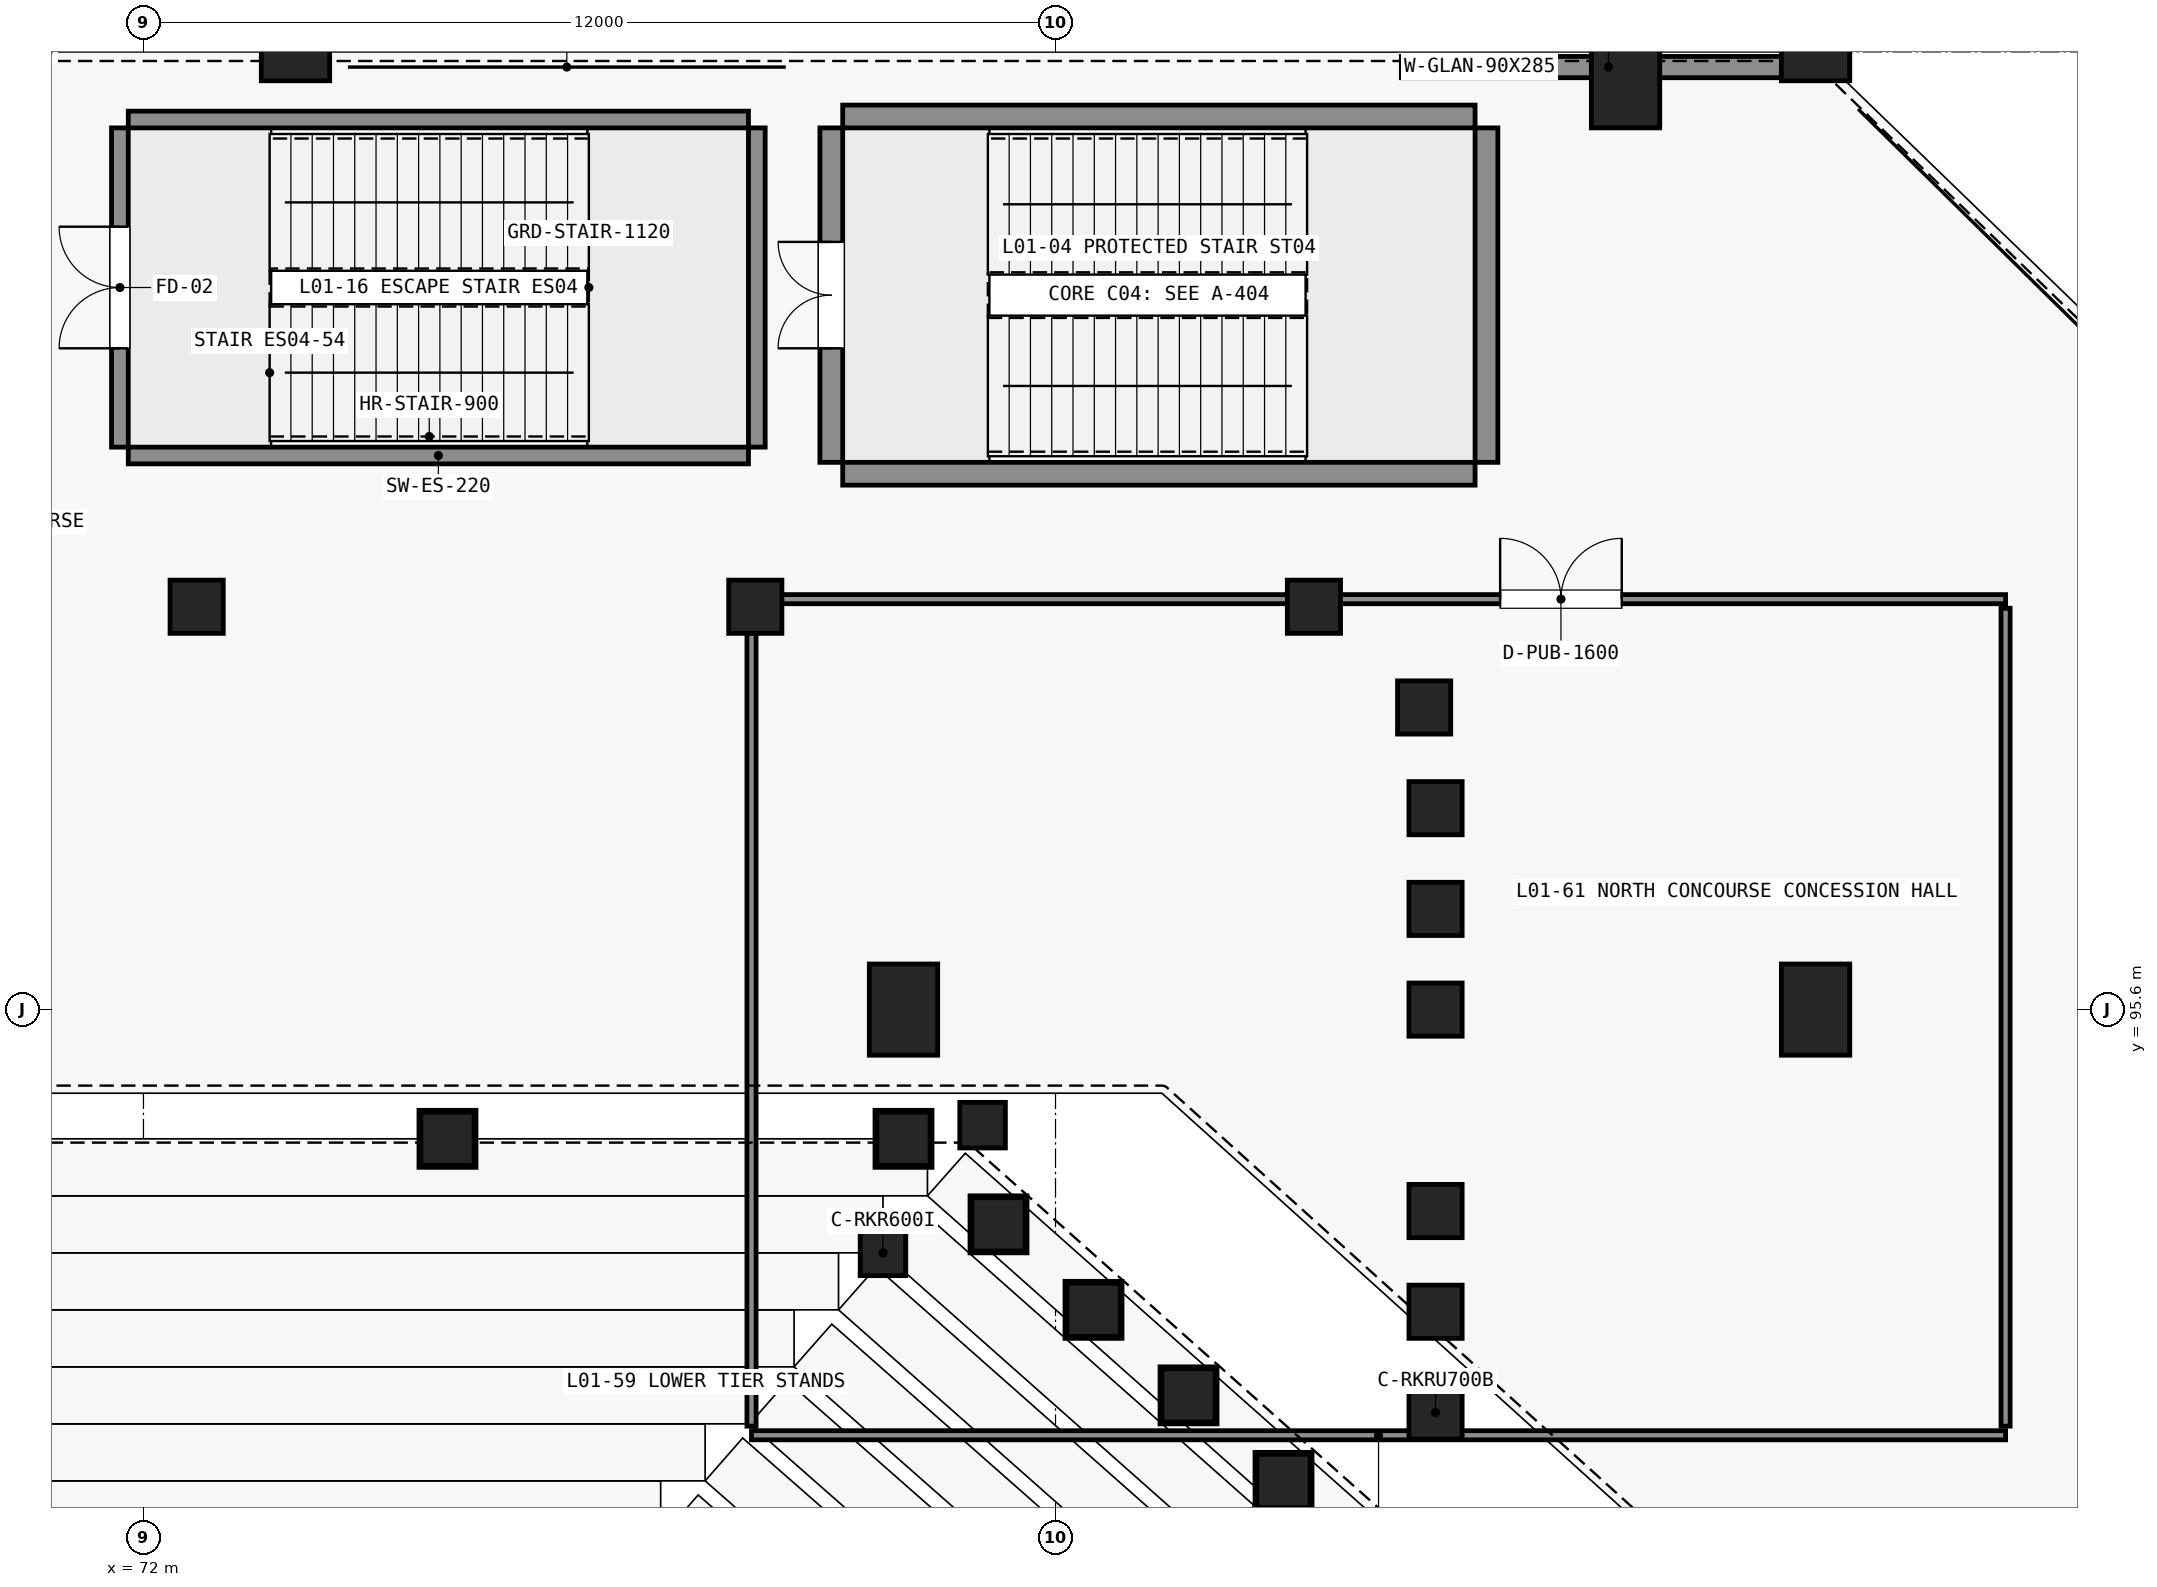
"""IFC4 building model, lengths in metres.
Left out: names, types, materials, properties, quantities, classifications, styles, units other than length and angle.
Written with IfcOpenShell. Run it as: python <this file> out.ifc"""

import sys

from ifc_helpers import new_model, si_unit, direction, frame, frame_2d, origin, origin_2d, place, context, subcontext, project, spatial, rectangle, extrude, element, fill, save


model = new_model("IFC4")
c1 = context("Model", 3, precision=1e-05, world=origin(), true_north=direction((0.0, 1.0)))
c2 = subcontext(c1, "Body", "Model", "MODEL_VIEW")
j1 = project(units=[si_unit("LENGTHUNIT", "METRE"), si_unit("PLANEANGLEUNIT", "RADIAN")], contexts=[c1])
p1 = place(None, origin())
s1 = spatial("IfcSite", under=j1, at=p1, CompositionType="ELEMENT")
p2 = place(p1, origin())
s2 = spatial("IfcBuilding", under=s1, at=p2, CompositionType="ELEMENT")
p3 = place(p2, frame((0.0, 0.0, 6.0)))
s3 = spatial("IfcBuildingStorey", under=s2, at=p3, CompositionType="ELEMENT", Elevation=6.0)
for number, where, z_axis, x_axis in (
    (1, (82.0, 95.6, 0.0), (0.0, 0.0, 1.0), (1.0, 0.0, 0.0)),
    (2, (94.0, 95.6, 0.0), (0.0, 0.0, 1.0), (1.0, 0.0, 0.0)),
):
    element("IfcColumn", number, at=place(p3, frame(where, z_axis=z_axis, x_axis=x_axis)), inside=s3, PredefinedType="COLUMN", context=c2, shape_type="SweptSolid", body=[
        extrude(rectangle(XDim=0.9, YDim=1.2, at=origin_2d()), origin(), (0.0, 0.0, 1.0), 5.4),
    ])
for number, where, z_axis, x_axis in (
    (3, (91.5, 107.8, 0.0), (0.0, 0.0, 1.0), (1.0, 0.0, 0.0)),
    (4, (74.0, 108.42, 0.0), (0.0, 0.0, 1.0), (1.0, 0.0, 0.0)),
    (5, (94.0, 108.42, 0.0), (0.0, 0.0, 1.0), (1.0, 0.0, 0.0)),
):
    element("IfcColumn", number, at=place(p3, frame(where, z_axis=z_axis, x_axis=x_axis)), inside=s3, PredefinedType="PILASTER", context=c2, shape_type="SweptSolid", body=[
        extrude(rectangle(XDim=0.9, YDim=1.2, at=origin_2d()), origin(), (0.0, 0.0, 1.0), 5.4),
    ])
for number, where, z_axis, x_axis in (
    (6, (81.2, 102.65, 0.0), (0.0, 0.0, 1.0), (1.0, 0.0, 0.0)),
    (7, (81.2, 107.35, 0.0), (0.0, 0.0, 1.0), (1.0, 0.0, 0.0)),
):
    element("IfcWall", number, at=place(p3, frame(where, z_axis=z_axis, x_axis=x_axis)), inside=s3, PredefinedType="SHEAR", context=c2, shape_type="SweptSolid", body=[
        extrude(rectangle(XDim=8.32, YDim=0.3, at=frame_2d((4.16, 0.0))), origin(), (0.0, 0.0, 1.0), 5.4),
    ])
p4 = place(p3, frame((81.05, 102.8, 0.0), z_axis=(0.0, 0.0, 1.0), x_axis=(0.0, 1.0, 0.0)))
e8 = element("IfcWall", 8, at=p4, inside=s3, PredefinedType="SHEAR", context=c2, shape_type="SweptSolid", body=[
    extrude(rectangle(XDim=4.4, YDim=0.3, at=frame_2d((2.2, 0.0))), origin(), (0.0, 0.0, 1.0), 5.4),
])
p5 = place(p4, frame((1.5, 0.0, 0.0)))
e9 = element("IfcOpeningElement", 9, at=p5, cuts=e8, PredefinedType="OPENING", context=c2, shape_type="SweptSolid", body=[
    extrude(rectangle(XDim=1.4, YDim=2.2, at=frame_2d((0.7, 1.1))), frame((0.0, 0.16, 0.0), z_axis=(0.0, -1.0, 0.0), x_axis=(1.0, 0.0, 0.0)), (0.0, 0.0, 1.0), 0.32),
])
p6 = place(p3, frame((89.67, 102.8, 0.0), z_axis=(0.0, 0.0, 1.0), x_axis=(0.0, 1.0, 0.0)))
e10 = element("IfcWall", 10, at=p6, inside=s3, PredefinedType="SHEAR", context=c2, shape_type="SweptSolid", body=[
    extrude(rectangle(XDim=4.4, YDim=0.3, at=frame_2d((2.2, 0.0))), origin(), (0.0, 0.0, 1.0), 5.4),
])
for number, where, z_axis, x_axis in (
    (11, (89.0, 90.3, 0.0), (0.0, 0.0, 1.0), (1.0, 0.0, 0.0)),
    (12, (89.0, 91.625, 0.0), (0.0, 0.0, 1.0), (1.0, 0.0, 0.0)),
    (13, (89.0, 92.95, 0.0), (0.0, 0.0, 1.0), (1.0, 0.0, 0.0)),
):
    element("IfcColumn", number, at=place(p3, frame(where, z_axis=z_axis, x_axis=x_axis)), inside=s3, PredefinedType="COLUMN", context=c2, shape_type="SweptSolid", body=[
        extrude(rectangle(XDim=0.7, YDim=0.7, at=origin_2d()), origin(), (0.0, 0.0, 1.0), 5.4),
    ])
p7 = place(p3, frame((87.0, 89.4, 0.0), z_axis=(0.0, 0.0, 1.0), x_axis=(1.0, 0.0, 0.0)))
e14 = element("IfcColumn", 14, at=p7, inside=s3, PredefinedType="COLUMN", context=c2, shape_type="SweptSolid", body=[
    extrude(rectangle(XDim=0.75, YDim=0.75, at=origin_2d()), origin(), (0.0, 0.0, 1.0), 2.55),
])
p8 = place(p3, frame((87.0, 89.4, 2.55), z_axis=(0.0, 0.0, 1.0), x_axis=(1.0, 0.0, 0.0)))
e15 = element("IfcColumn", 15, at=p8, inside=s3, PredefinedType="COLUMN", context=c2, shape_type="SweptSolid", body=[
    extrude(rectangle(XDim=0.7, YDim=0.7, at=origin_2d()), origin(), (0.0, 0.0, 1.0), 2.85),
])
p9 = place(p3, frame((89.0, 95.6, 0.0), z_axis=(0.0, 0.0, 1.0), x_axis=(1.0, 0.0, 0.0)))
e16 = element("IfcColumn", 16, at=p9, inside=s3, PredefinedType="COLUMN", context=c2, shape_type="SweptSolid", body=[
    extrude(rectangle(XDim=0.7, YDim=0.7, at=origin_2d()), origin(), (0.0, 0.0, 1.0), 5.4),
])
p10 = place(p3, frame((85.75, 90.525, 0.0), z_axis=(0.0, 0.0, 1.0), x_axis=(1.0, 0.0, 0.0)))
e17 = element("IfcColumn", 17, at=p10, inside=s3, PredefinedType="COLUMN", context=c2, shape_type="SweptSolid", body=[
    extrude(rectangle(XDim=0.75, YDim=0.75, at=origin_2d()), origin(), (0.0, 0.0, 1.0), 2.55),
])
p11 = place(p3, frame((85.75, 90.525, 2.55), z_axis=(0.0, 0.0, 1.0), x_axis=(1.0, 0.0, 0.0)))
e18 = element("IfcColumn", 18, at=p11, inside=s3, PredefinedType="COLUMN", context=c2, shape_type="SweptSolid", body=[
    extrude(rectangle(XDim=0.7, YDim=0.7, at=origin_2d()), origin(), (0.0, 0.0, 1.0), 2.85),
])
p12 = place(p3, frame((89.0, 96.925, 0.0), z_axis=(0.0, 0.0, 1.0), x_axis=(1.0, 0.0, 0.0)))
e19 = element("IfcColumn", 19, at=p12, inside=s3, PredefinedType="COLUMN", context=c2, shape_type="SweptSolid", body=[
    extrude(rectangle(XDim=0.7, YDim=0.7, at=origin_2d()), origin(), (0.0, 0.0, 1.0), 5.4),
])
p13 = place(p3, frame((84.5, 91.65, 0.0), z_axis=(0.0, 0.0, 1.0), x_axis=(1.0, 0.0, 0.0)))
e20 = element("IfcColumn", 20, at=p13, inside=s3, PredefinedType="COLUMN", context=c2, shape_type="SweptSolid", body=[
    extrude(rectangle(XDim=0.75, YDim=0.75, at=origin_2d()), origin(), (0.0, 0.0, 1.0), 2.55),
])
p14 = place(p3, frame((84.5, 91.65, 2.55), z_axis=(0.0, 0.0, 1.0), x_axis=(1.0, 0.0, 0.0)))
e21 = element("IfcColumn", 21, at=p14, inside=s3, PredefinedType="COLUMN", context=c2, shape_type="SweptSolid", body=[
    extrude(rectangle(XDim=0.7, YDim=0.7, at=origin_2d()), origin(), (0.0, 0.0, 1.0), 2.85),
])
p15 = place(p3, frame((89.0, 98.25, 0.0), z_axis=(0.0, 0.0, 1.0), x_axis=(1.0, 0.0, 0.0)))
e22 = element("IfcColumn", 22, at=p15, inside=s3, PredefinedType="COLUMN", context=c2, shape_type="SweptSolid", body=[
    extrude(rectangle(XDim=0.7, YDim=0.7, at=origin_2d()), origin(), (0.0, 0.0, 1.0), 5.4),
])
p16 = place(p3, frame((83.25, 92.775, 0.0), z_axis=(0.0, 0.0, 1.0), x_axis=(1.0, 0.0, 0.0)))
e23 = element("IfcColumn", 23, at=p16, inside=s3, PredefinedType="COLUMN", context=c2, shape_type="SweptSolid", body=[
    extrude(rectangle(XDim=0.75, YDim=0.75, at=origin_2d()), origin(), (0.0, 0.0, 1.0), 2.55),
])
p17 = place(p3, frame((83.25, 92.775, 2.55), z_axis=(0.0, 0.0, 1.0), x_axis=(1.0, 0.0, 0.0)))
e24 = element("IfcColumn", 24, at=p17, inside=s3, PredefinedType="COLUMN", context=c2, shape_type="SweptSolid", body=[
    extrude(rectangle(XDim=0.7, YDim=0.7, at=origin_2d()), origin(), (0.0, 0.0, 1.0), 2.85),
])
p18 = place(p3, frame((88.85, 99.575, 0.0), z_axis=(0.0, 0.0, 1.0), x_axis=(1.0, 0.0, 0.0)))
e25 = element("IfcColumn", 25, at=p18, inside=s3, PredefinedType="COLUMN", context=c2, shape_type="SweptSolid", body=[
    extrude(rectangle(XDim=0.7, YDim=0.7, at=origin_2d()), origin(), (0.0, 0.0, 1.0), 5.4),
])
p19 = place(p3, frame((82.0, 93.9, 0.0), z_axis=(0.0, 0.0, 1.0), x_axis=(1.0, 0.0, 0.0)))
e26 = element("IfcColumn", 26, at=p19, inside=s3, PredefinedType="COLUMN", context=c2, shape_type="SweptSolid", body=[
    extrude(rectangle(XDim=0.75, YDim=0.75, at=origin_2d()), origin(), (0.0, 0.0, 1.0), 2.55),
])
p20 = place(p3, frame((82.0, 93.9, 2.55), z_axis=(0.0, 0.0, 1.0), x_axis=(1.0, 0.0, 0.0)))
e27 = element("IfcColumn", 27, at=p20, inside=s3, PredefinedType="COLUMN", context=c2, shape_type="SweptSolid", body=[
    extrude(rectangle(XDim=0.7, YDim=0.7, at=origin_2d()), origin(), (0.0, 0.0, 1.0), 2.85),
])
p21 = place(p3, frame((87.4, 100.9, 0.0), z_axis=(0.0, 0.0, 1.0), x_axis=(1.0, 0.0, 0.0)))
e28 = element("IfcColumn", 28, at=p21, inside=s3, PredefinedType="COLUMN", context=c2, shape_type="SweptSolid", body=[
    extrude(rectangle(XDim=0.7, YDim=0.7, at=origin_2d()), origin(), (0.0, 0.0, 1.0), 5.4),
])
p22 = place(p3, frame((76.0, 93.9, 0.0), z_axis=(0.0, 0.0, 1.0), x_axis=(1.0, 0.0, 0.0)))
e29 = element("IfcColumn", 29, at=p22, inside=s3, PredefinedType="COLUMN", context=c2, shape_type="SweptSolid", body=[
    extrude(rectangle(XDim=0.75, YDim=0.75, at=origin_2d()), origin(), (0.0, 0.0, 1.0), 2.55),
])
p23 = place(p3, frame((76.0, 93.9, 2.55), z_axis=(0.0, 0.0, 1.0), x_axis=(1.0, 0.0, 0.0)))
e30 = element("IfcColumn", 30, at=p23, inside=s3, PredefinedType="COLUMN", context=c2, shape_type="SweptSolid", body=[
    extrude(rectangle(XDim=0.7, YDim=0.7, at=origin_2d()), origin(), (0.0, 0.0, 1.0), 2.85),
])
for number, where, z_axis, x_axis in (
    (31, (80.05, 100.9, 0.0), (0.0, 0.0, 1.0), (1.0, 0.0, 0.0)),
    (32, (72.7, 100.9, 0.0), (0.0, 0.0, 1.0), (1.0, 0.0, 0.0)),
):
    element("IfcColumn", number, at=place(p3, frame(where, z_axis=z_axis, x_axis=x_axis)), inside=s3, PredefinedType="COLUMN", context=c2, shape_type="SweptSolid", body=[
        extrude(rectangle(XDim=0.7, YDim=0.7, at=origin_2d()), origin(), (0.0, 0.0, 1.0), 5.4),
    ])
p24 = place(p3, frame((81.73, 92.4, 0.0), z_axis=(0.0, 0.0, 1.0), x_axis=(1.0, 0.0, 0.0)))
e33 = element("IfcColumn", 33, at=p24, inside=s3, PredefinedType="COLUMN", context=c2, shape_type="SweptSolid", body=[
    extrude(rectangle(XDim=0.6, YDim=0.6, at=origin_2d()), origin(), (0.0, 0.0, 1.0), 1.895),
])
p25 = place(p3, frame((83.04, 94.08, 0.0), z_axis=(0.0, 0.0, 1.0), x_axis=(1.0, 0.0, 0.0)))
e34 = element("IfcColumn", 34, at=p25, inside=s3, PredefinedType="COLUMN", context=c2, shape_type="SweptSolid", body=[
    extrude(rectangle(XDim=0.6, YDim=0.6, at=origin_2d()), origin(), (0.0, 0.0, 1.0), 2.16),
])
p26 = place(p3, frame((88.55, 108.0, 0.0), z_axis=(0.0, 0.0, 1.0), x_axis=(1.0, 0.0, 0.0)))
e35 = element("IfcWall", 35, at=p26, inside=s3, PredefinedType="STANDARD", context=c2, shape_type="SweptSolid", body=[
    extrude(rectangle(XDim=5.45, YDim=0.28, at=frame_2d((2.725, 0.0))), origin(), (0.0, 0.0, 1.0), 5.04),
])
p27 = place(p26, frame((1.1, 0.0, 0.95)))
e36 = element("IfcOpeningElement", 36, at=p27, cuts=e35, PredefinedType="OPENING", context=c2, shape_type="SweptSolid", body=[
    extrude(rectangle(XDim=0.9, YDim=2.85, at=frame_2d((0.45, 1.425))), frame((0.0, 0.15, 0.0), z_axis=(0.0, -1.0, 0.0), x_axis=(1.0, 0.0, 0.0)), (0.0, 0.0, 1.0), 0.3),
])
for number, where, z_axis, x_axis in (
    (37, (71.8, 102.89, 0.0), (0.0, 0.0, 1.0), (1.0, 0.0, 0.0)),
    (38, (71.8, 107.31, 0.0), (0.0, 0.0, 1.0), (1.0, 0.0, 0.0)),
):
    element("IfcWall", number, at=place(p3, frame(where, z_axis=z_axis, x_axis=x_axis)), inside=s3, PredefinedType="SHEAR", context=c2, shape_type="SweptSolid", body=[
        extrude(rectangle(XDim=8.16, YDim=0.22, at=frame_2d((4.08, 0.0))), origin(), (0.0, 0.0, 1.0), 5.4),
    ])
p28 = place(p3, frame((71.69, 103.0, 0.0), z_axis=(0.0, 0.0, 1.0), x_axis=(0.0, 1.0, 0.0)))
e39 = element("IfcWall", 39, at=p28, inside=s3, PredefinedType="SHEAR", context=c2, shape_type="SweptSolid", body=[
    extrude(rectangle(XDim=4.2, YDim=0.22, at=frame_2d((2.1, 0.0))), origin(), (0.0, 0.0, 1.0), 5.4),
])
p29 = place(p28, frame((1.3, 0.0, 0.0)))
e40 = element("IfcOpeningElement", 40, at=p29, cuts=e39, PredefinedType="OPENING", context=c2, shape_type="SweptSolid", body=[
    extrude(rectangle(XDim=1.6, YDim=2.2, at=frame_2d((0.8, 1.1))), frame((0.0, 0.12, 0.0), z_axis=(0.0, -1.0, 0.0), x_axis=(1.0, 0.0, 0.0)), (0.0, 0.0, 1.0), 0.24),
])
p30 = place(p3, frame((80.07, 103.0, 0.0), z_axis=(0.0, 0.0, 1.0), x_axis=(0.0, 1.0, 0.0)))
e41 = element("IfcWall", 41, at=p30, inside=s3, PredefinedType="SHEAR", context=c2, shape_type="SweptSolid", body=[
    extrude(rectangle(XDim=4.2, YDim=0.22, at=frame_2d((2.1, 0.0))), origin(), (0.0, 0.0, 1.0), 5.4),
])
p31 = place(p3, frame((80.0, 90.0, 0.0), z_axis=(0.0, 0.0, 1.0), x_axis=(1.0, 0.0, 0.0)))
e42 = element("IfcWall", 42, at=p31, inside=s3, PredefinedType="PARTITIONING", context=c2, shape_type="SweptSolid", body=[
    extrude(rectangle(XDim=16.5, YDim=0.12, at=frame_2d((8.25, 0.0))), origin(), (0.0, 0.0, 1.0), 5.04),
])
p32 = place(p3, frame((80.0, 101.0, 0.0), z_axis=(0.0, 0.0, 1.0), x_axis=(1.0, 0.0, 0.0)))
e43 = element("IfcWall", 43, at=p32, inside=s3, PredefinedType="PARTITIONING", context=c2, shape_type="SweptSolid", body=[
    extrude(rectangle(XDim=16.5, YDim=0.12, at=frame_2d((8.25, 0.0))), origin(), (0.0, 0.0, 1.0), 2.775),
])
p33 = place(p32, frame((9.85, 0.0, 0.0)))
e44 = element("IfcOpeningElement", 44, at=p33, cuts=e43, PredefinedType="OPENING", context=c2, shape_type="SweptSolid", body=[
    extrude(rectangle(XDim=1.6, YDim=2.25, at=frame_2d((0.8, 1.125))), frame((0.0, 0.07, 0.0), z_axis=(0.0, -1.0, 0.0), x_axis=(1.0, 0.0, 0.0)), (0.0, 0.0, 1.0), 0.14),
])
p34 = place(p3, frame((80.0, 90.12, 0.0), z_axis=(0.0, 0.0, 1.0), x_axis=(0.0, 1.0, 0.0)))
e45 = element("IfcWall", 45, at=p34, inside=s3, PredefinedType="PARTITIONING", context=c2, shape_type="SweptSolid", body=[
    extrude(rectangle(XDim=10.76, YDim=0.12, at=frame_2d((5.38, 0.0))), origin(), (0.0, 0.0, 1.0), 2.775),
])
p35 = place(p3, frame((96.5, 90.12, 0.0), z_axis=(0.0, 0.0, 1.0), x_axis=(0.0, 1.0, 0.0)))
e46 = element("IfcWall", 46, at=p35, inside=s3, PredefinedType="PARTITIONING", context=c2, shape_type="SweptSolid", body=[
    extrude(rectangle(XDim=10.76, YDim=0.12, at=frame_2d((5.38, 0.0))), origin(), (0.0, 0.0, 1.0), 5.04),
])
p36 = place(p27, origin())
e47 = element("IfcWindow", 47, at=p36, inside=s3, PartitioningType="DOUBLE_PANEL_VERTICAL", PredefinedType="WINDOW", context=c2, shape_type="SweptSolid", body=[
    extrude(rectangle(XDim=0.9, YDim=2.85, at=frame_2d((0.45, 1.425))), frame((0.0, 0.03, 0.0), z_axis=(0.0, -1.0, 0.0), x_axis=(1.0, 0.0, 0.0)), (0.0, 0.0, 1.0), 0.06),
])
fill(e36, e47)
p37 = place(p5, origin())
e48 = element("IfcDoor", 48, at=p37, inside=s3, OperationType="DOUBLE_DOOR_SINGLE_SWING", PredefinedType="DOOR", context=c2, shape_type="SweptSolid", body=[
    extrude(rectangle(XDim=1.4, YDim=2.2, at=frame_2d((0.7, 1.1))), frame((0.0, 0.025, 0.0), z_axis=(0.0, -1.0, 0.0), x_axis=(1.0, 0.0, 0.0)), (0.0, 0.0, 1.0), 0.05),
])
fill(e9, e48)
p38 = place(p29, origin())
e49 = element("IfcDoor", 49, at=p38, inside=s3, OperationType="DOUBLE_DOOR_SINGLE_SWING", PredefinedType="DOOR", context=c2, shape_type="SweptSolid", body=[
    extrude(rectangle(XDim=1.6, YDim=2.2, at=frame_2d((0.8, 1.1))), frame((0.0, 0.025, 0.0), z_axis=(0.0, -1.0, 0.0), x_axis=(1.0, 0.0, 0.0)), (0.0, 0.0, 1.0), 0.05),
])
fill(e40, e49)
p39 = place(p33, origin())
e50 = element("IfcDoor", 50, at=p39, inside=s3, OperationType="DOUBLE_DOOR_SINGLE_SWING", PredefinedType="DOOR", context=c2, shape_type="SweptSolid", body=[
    extrude(rectangle(XDim=1.6, YDim=2.25, at=frame_2d((0.8, 1.125))), frame((0.0, 0.025, 0.0), z_axis=(0.0, -1.0, 0.0), x_axis=(1.0, 0.0, 0.0)), (0.0, 0.0, 1.0), 0.05),
])
fill(e44, e50)
save(model, sys.argv[1])
